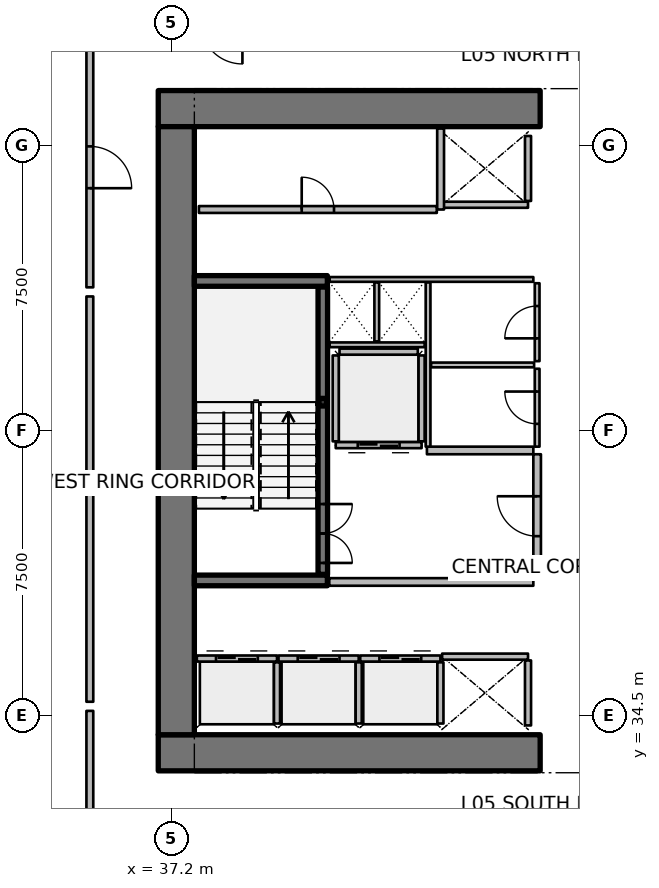
"""IFC4 building model, lengths in metres.
Left out: names, types, materials, properties, quantities, classifications, styles, units other than length and angle.
Written with IfcOpenShell. Run it as: python <this file> out.ifc"""

import sys

from ifc_helpers import new_model, si_unit, direction, frame, frame_2d, origin, origin_2d, place, context, subcontext, project, spatial, rectangle, hollow_rectangle, extrude, element, fill, save


model = new_model("IFC4")
c1 = context("Model", 3, precision=1e-05, world=origin(), true_north=direction((0.0, 1.0)))
c2 = subcontext(c1, "Body", "Model", "MODEL_VIEW")
j1 = project(units=[si_unit("LENGTHUNIT", "METRE"), si_unit("PLANEANGLEUNIT", "RADIAN")], contexts=[c1])
p1 = place(None, origin())
s1 = spatial("IfcSite", under=j1, at=p1, CompositionType="ELEMENT")
p2 = place(p1, origin())
s2 = spatial("IfcBuilding", under=s1, at=p2, CompositionType="ELEMENT")
p3 = place(p2, frame((0.0, 0.0, 26.4)))
s3 = spatial("IfcBuildingStorey", under=s2, at=p3, CompositionType="ELEMENT", Elevation=26.4)
for number, where, z_axis, x_axis in (
    (1, (36.85, 33.525, 0.0), (0.0, 0.0, 1.0), (1.0, 0.0, 0.0)),
    (2, (36.85, 50.475, 0.0), (0.0, 0.0, 1.0), (1.0, 0.0, 0.0)),
):
    element("IfcWall", number, at=place(p3, frame(where, z_axis=z_axis, x_axis=x_axis)), inside=s3, PredefinedType="SHEAR", context=c2, shape_type="SweptSolid", body=[
        extrude(rectangle(XDim=10.05, YDim=0.95, at=frame_2d((5.025, 0.0))), origin(), (0.0, 0.0, 1.0), 3.75),
    ])
p4 = place(p3, frame((37.325, 34.0, 0.0), z_axis=(0.0, 0.0, 1.0), x_axis=(0.0, 1.0, 0.0)))
e3 = element("IfcWall", 3, at=p4, inside=s3, PredefinedType="SHEAR", context=c2, shape_type="SweptSolid", body=[
    extrude(rectangle(XDim=16.0, YDim=0.95, at=frame_2d((8.0, 0.0))), origin(), (0.0, 0.0, 1.0), 3.75),
])
for number, where, z_axis, x_axis in (
    (4, (37.8, 38.06, 0.0), (0.0, 0.0, 1.0), (1.0, 0.0, 0.0)),
    (5, (37.8, 45.94, 0.0), (0.0, 0.0, 1.0), (1.0, 0.0, 0.0)),
):
    element("IfcWall", number, at=place(p3, frame(where, z_axis=z_axis, x_axis=x_axis)), inside=s3, PredefinedType="SHEAR", context=c2, shape_type="SweptSolid", body=[
        extrude(rectangle(XDim=3.5, YDim=0.28, at=frame_2d((1.75, 0.0))), origin(), (0.0, 0.0, 1.0), 3.75),
    ])
p5 = place(p3, frame((41.18, 42.75, 0.0), z_axis=(0.0, 0.0, 1.0), x_axis=(1.0, 0.0, 0.0)))
e6 = element("IfcColumn", 6, at=p5, inside=s3, PredefinedType="COLUMN", context=c2, shape_type="SweptSolid", body=[
    extrude(hollow_rectangle(XDim=0.2, YDim=0.2, WallThickness=0.01, InnerFilletRadius=0.01, OuterFilletRadius=0.02, at=origin_2d()), origin(), (0.0, 0.0, 1.0), 1.67),
])
p6 = place(p3, frame((41.18, 38.22, 0.0), z_axis=(0.0, 0.0, 1.0), x_axis=(0.0, 1.0, 0.0)))
e7 = element("IfcWall", 7, at=p6, inside=s3, PredefinedType="SOLIDWALL", context=c2, shape_type="SweptSolid", body=[
    extrude(rectangle(XDim=7.56, YDim=0.25, at=frame_2d((3.78, 0.0))), origin(), (0.0, 0.0, 1.0), 3.5),
])
p7 = place(p6, frame((0.3, 0.0, 0.0)))
e8 = element("IfcOpeningElement", 8, at=p7, cuts=e7, PredefinedType="OPENING", context=c2, shape_type="SweptSolid", body=[
    extrude(rectangle(XDim=1.55, YDim=2.15, at=frame_2d((0.775, 1.075))), frame((0.0, 0.135, 0.0), z_axis=(0.0, -1.0, 0.0), x_axis=(1.0, 0.0, 0.0)), (0.0, 0.0, 1.0), 0.27),
])
p8 = place(p3, frame((37.865, 36.005, 0.0), z_axis=(0.0, 0.0, 1.0), x_axis=(1.0, 0.0, 0.0)))
e9 = element("IfcWall", 9, at=p8, inside=s3, PredefinedType="PARTITIONING", context=c2, shape_type="SweptSolid", body=[
    extrude(rectangle(XDim=2.11, YDim=0.16, at=frame_2d((1.055, 0.0))), origin(), (0.0, 0.0, 1.0), 3.5),
])
p9 = place(p8, frame((0.505, 0.0, 0.0)))
e10 = element("IfcOpeningElement", 10, at=p9, cuts=e9, PredefinedType="OPENING", context=c2, shape_type="SweptSolid", body=[
    extrude(rectangle(XDim=1.1, YDim=2.1, at=frame_2d((0.55, 1.05))), frame((0.0, 0.09, 0.0), z_axis=(0.0, -1.0, 0.0), x_axis=(1.0, 0.0, 0.0)), (0.0, 0.0, 1.0), 0.18),
])
p10 = place(p3, frame((39.975, 34.295, 0.0), z_axis=(0.0, 0.0, 1.0), x_axis=(0.0, 1.0, 0.0)))
e11 = element("IfcWall", 11, at=p10, inside=s3, PredefinedType="PARTITIONING", context=c2, shape_type="SweptSolid", body=[
    extrude(rectangle(XDim=1.61, YDim=0.16, at=frame_2d((0.805, 0.0))), origin(), (0.0, 0.0, 1.0), 3.5),
])
p11 = place(p3, frame((40.015, 36.005, 0.0), z_axis=(0.0, 0.0, 1.0), x_axis=(1.0, 0.0, 0.0)))
e12 = element("IfcWall", 12, at=p11, inside=s3, PredefinedType="PARTITIONING", context=c2, shape_type="SweptSolid", body=[
    extrude(rectangle(XDim=2.11, YDim=0.16, at=frame_2d((1.055, 0.0))), origin(), (0.0, 0.0, 1.0), 3.5),
])
p12 = place(p11, frame((0.505, 0.0, 0.0)))
e13 = element("IfcOpeningElement", 13, at=p12, cuts=e12, PredefinedType="OPENING", context=c2, shape_type="SweptSolid", body=[
    extrude(rectangle(XDim=1.1, YDim=2.1, at=frame_2d((0.55, 1.05))), frame((0.0, 0.09, 0.0), z_axis=(0.0, -1.0, 0.0), x_axis=(1.0, 0.0, 0.0)), (0.0, 0.0, 1.0), 0.18),
])
p13 = place(p3, frame((42.125, 34.295, 0.0), z_axis=(0.0, 0.0, 1.0), x_axis=(0.0, 1.0, 0.0)))
e14 = element("IfcWall", 14, at=p13, inside=s3, PredefinedType="PARTITIONING", context=c2, shape_type="SweptSolid", body=[
    extrude(rectangle(XDim=1.61, YDim=0.16, at=frame_2d((0.805, 0.0))), origin(), (0.0, 0.0, 1.0), 3.5),
])
p14 = place(p3, frame((42.165, 36.005, 0.0), z_axis=(0.0, 0.0, 1.0), x_axis=(1.0, 0.0, 0.0)))
e15 = element("IfcWall", 15, at=p14, inside=s3, PredefinedType="PARTITIONING", context=c2, shape_type="SweptSolid", body=[
    extrude(rectangle(XDim=2.11, YDim=0.16, at=frame_2d((1.055, 0.0))), origin(), (0.0, 0.0, 1.0), 3.5),
])
p15 = place(p14, frame((0.505, 0.0, 0.0)))
e16 = element("IfcOpeningElement", 16, at=p15, cuts=e15, PredefinedType="OPENING", context=c2, shape_type="SweptSolid", body=[
    extrude(rectangle(XDim=1.1, YDim=2.1, at=frame_2d((0.55, 1.05))), frame((0.0, 0.09, 0.0), z_axis=(0.0, -1.0, 0.0), x_axis=(1.0, 0.0, 0.0)), (0.0, 0.0, 1.0), 0.18),
])
p16 = place(p3, frame((44.275, 34.295, 0.0), z_axis=(0.0, 0.0, 1.0), x_axis=(0.0, 1.0, 0.0)))
e17 = element("IfcWall", 17, at=p16, inside=s3, PredefinedType="PARTITIONING", context=c2, shape_type="SweptSolid", body=[
    extrude(rectangle(XDim=1.61, YDim=0.16, at=frame_2d((0.805, 0.0))), origin(), (0.0, 0.0, 1.0), 3.5),
])
p17 = place(p3, frame((46.58, 47.945, 0.0), z_axis=(0.0, 0.0, 1.0), x_axis=(-1.0, 0.0, 0.0)))
e18 = element("IfcWall", 18, at=p17, inside=s3, PredefinedType="PARTITIONING", context=c2, shape_type="SweptSolid", body=[
    extrude(rectangle(XDim=2.26, YDim=0.16, at=frame_2d((1.13, 0.0))), origin(), (0.0, 0.0, 1.0), 3.5),
])
p18 = place(p3, frame((46.58, 48.045, 0.0), z_axis=(0.0, 0.0, 1.0), x_axis=(0.0, 1.0, 0.0)))
e19 = element("IfcWall", 19, at=p18, inside=s3, PredefinedType="PARTITIONING", context=c2, shape_type="SweptSolid", body=[
    extrude(rectangle(XDim=1.71, YDim=0.16, at=frame_2d((0.855, 0.0))), origin(), (0.0, 0.0, 1.0), 3.5),
])
p19 = place(p3, frame((44.32, 36.055, 0.0), z_axis=(0.0, 0.0, 1.0), x_axis=(1.0, 0.0, 0.0)))
e20 = element("IfcWall", 20, at=p19, inside=s3, PredefinedType="PARTITIONING", context=c2, shape_type="SweptSolid", body=[
    extrude(rectangle(XDim=2.26, YDim=0.16, at=frame_2d((1.13, 0.0))), origin(), (0.0, 0.0, 1.0), 3.5),
])
p20 = place(p3, frame((46.58, 34.245, 0.0), z_axis=(0.0, 0.0, 1.0), x_axis=(0.0, 1.0, 0.0)))
e21 = element("IfcWall", 21, at=p20, inside=s3, PredefinedType="PARTITIONING", context=c2, shape_type="SweptSolid", body=[
    extrude(rectangle(XDim=1.71, YDim=0.16, at=frame_2d((0.855, 0.0))), origin(), (0.0, 0.0, 1.0), 3.5),
])
p21 = place(p3, frame((43.78, 41.62, 0.0), z_axis=(0.0, 0.0, 1.0), x_axis=(-1.0, 0.0, 0.0)))
e22 = element("IfcWall", 22, at=p21, inside=s3, PredefinedType="PARTITIONING", context=c2, shape_type="SweptSolid", body=[
    extrude(rectangle(XDim=2.26, YDim=0.16, at=frame_2d((1.13, 0.0))), origin(), (0.0, 0.0, 1.0), 3.5),
])
p22 = place(p21, frame((0.58, 0.0, 0.0)))
e23 = element("IfcOpeningElement", 23, at=p22, cuts=e22, PredefinedType="OPENING", context=c2, shape_type="SweptSolid", body=[
    extrude(rectangle(XDim=1.1, YDim=2.1, at=frame_2d((0.55, 1.05))), frame((0.0, 0.09, 0.0), z_axis=(0.0, -1.0, 0.0), x_axis=(1.0, 0.0, 0.0)), (0.0, 0.0, 1.0), 0.18),
])
for number, where, z_axis, x_axis in (
    (24, (43.78, 41.72, 0.0), (0.0, 0.0, 1.0), (0.0, 1.0, 0.0)),
    (25, (41.52, 41.72, 0.0), (0.0, 0.0, 1.0), (0.0, 1.0, 0.0)),
):
    element("IfcWall", number, at=place(p3, frame(where, z_axis=z_axis, x_axis=x_axis)), inside=s3, PredefinedType="PARTITIONING", context=c2, shape_type="SweptSolid", body=[
        extrude(rectangle(XDim=2.26, YDim=0.16, at=frame_2d((1.13, 0.0))), origin(), (0.0, 0.0, 1.0), 3.5),
    ])
p23 = place(p3, frame((41.62, 44.08, 0.0), z_axis=(0.0, 0.0, 1.0), x_axis=(1.0, 0.0, 0.0)))
e26 = element("IfcWall", 26, at=p23, inside=s3, PredefinedType="PARTITIONING", context=c2, shape_type="SweptSolid", body=[
    extrude(rectangle(XDim=2.06, YDim=0.16, at=frame_2d((1.03, 0.0))), origin(), (0.0, 0.0, 1.0), 3.5),
])
p24 = place(p3, frame((37.92, 47.82, 0.0), z_axis=(0.0, 0.0, 1.0), x_axis=(1.0, 0.0, 0.0)))
e27 = element("IfcWall", 27, at=p24, inside=s3, PredefinedType="PARTITIONING", context=c2, shape_type="SweptSolid", body=[
    extrude(rectangle(XDim=6.26, YDim=0.18, at=frame_2d((3.13, 0.0))), origin(), (0.0, 0.0, 1.0), 3.5),
])
p25 = place(p24, frame((2.705, 0.0, 0.0)))
e28 = element("IfcOpeningElement", 28, at=p25, cuts=e27, PredefinedType="OPENING", context=c2, shape_type="SweptSolid", body=[
    extrude(rectangle(XDim=0.85, YDim=2.06, at=frame_2d((0.425, 1.03))), frame((0.0, 0.1, 0.0), z_axis=(0.0, -1.0, 0.0), x_axis=(1.0, 0.0, 0.0)), (0.0, 0.0, 1.0), 0.2),
])
p26 = place(p3, frame((44.28, 47.82, 0.0), z_axis=(0.0, 0.0, 1.0), x_axis=(0.0, 1.0, 0.0)))
e29 = element("IfcWall", 29, at=p26, inside=s3, PredefinedType="PARTITIONING", context=c2, shape_type="SweptSolid", body=[
    extrude(rectangle(XDim=2.13, YDim=0.18, at=frame_2d((1.065, 0.0))), origin(), (0.0, 0.0, 1.0), 3.5),
])
p27 = place(p3, frame((41.35, 38.02, 0.0), z_axis=(0.0, 0.0, 1.0), x_axis=(1.0, 0.0, 0.0)))
e30 = element("IfcWall", 30, at=p27, inside=s3, PredefinedType="PARTITIONING", context=c2, shape_type="SweptSolid", body=[
    extrude(rectangle(XDim=5.37, YDim=0.2, at=frame_2d((2.685, 0.0))), origin(), (0.0, 0.0, 1.0), 3.5),
])
p28 = place(p3, frame((43.92, 41.48, 0.0), z_axis=(0.0, 0.0, 1.0), x_axis=(1.0, 0.0, 0.0)))
e31 = element("IfcWall", 31, at=p28, inside=s3, PredefinedType="PARTITIONING", context=c2, shape_type="SweptSolid", body=[
    extrude(rectangle(XDim=2.8, YDim=0.2, at=frame_2d((1.4, 0.0))), origin(), (0.0, 0.0, 1.0), 3.5),
])
p29 = place(p3, frame((46.82, 38.12, 0.0), z_axis=(0.0, 0.0, 1.0), x_axis=(0.0, 1.0, 0.0)))
e32 = element("IfcWall", 32, at=p29, inside=s3, PredefinedType="PARTITIONING", context=c2, shape_type="SweptSolid", body=[
    extrude(rectangle(XDim=3.26, YDim=0.2, at=frame_2d((1.63, 0.0))), origin(), (0.0, 0.0, 1.0), 3.5),
])
p30 = place(p29, frame((1.105, 0.0, 0.0)))
e33 = element("IfcOpeningElement", 33, at=p30, cuts=e32, PredefinedType="OPENING", context=c2, shape_type="SweptSolid", body=[
    extrude(rectangle(XDim=1.05, YDim=2.1, at=frame_2d((0.525, 1.05))), frame((0.0, 0.11, 0.0), z_axis=(0.0, -1.0, 0.0), x_axis=(1.0, 0.0, 0.0)), (0.0, 0.0, 1.0), 0.22),
])
p31 = place(p3, frame((41.36, 45.98, 0.0), z_axis=(0.0, 0.0, 1.0), x_axis=(1.0, 0.0, 0.0)))
e34 = element("IfcWall", 34, at=p31, inside=s3, PredefinedType="PARTITIONING", context=c2, shape_type="SweptSolid", body=[
    extrude(rectangle(XDim=5.36, YDim=0.125, at=frame_2d((2.68, 0.0))), origin(), (0.0, 0.0, 1.0), 2.94),
])
p32 = place(p3, frame((41.36, 44.26, 0.0), z_axis=(0.0, 0.0, 1.0), x_axis=(1.0, 0.0, 0.0)))
e35 = element("IfcWall", 35, at=p32, inside=s3, PredefinedType="PARTITIONING", context=c2, shape_type="SweptSolid", body=[
    extrude(rectangle(XDim=2.5, YDim=0.125, at=frame_2d((1.25, 0.0))), origin(), (0.0, 0.0, 1.0), 2.94),
])
p33 = place(p3, frame((42.6, 44.35, 0.0), z_axis=(0.0, 0.0, 1.0), x_axis=(0.0, 1.0, 0.0)))
e36 = element("IfcWall", 36, at=p33, inside=s3, PredefinedType="PARTITIONING", context=c2, shape_type="SweptSolid", body=[
    extrude(rectangle(XDim=1.55, YDim=0.125, at=frame_2d((0.775, 0.0))), origin(), (0.0, 0.0, 1.0), 2.94),
])
p34 = place(p3, frame((43.95, 41.58, 0.0), z_axis=(0.0, 0.0, 1.0), x_axis=(0.0, 1.0, 0.0)))
e37 = element("IfcWall", 37, at=p34, inside=s3, PredefinedType="PARTITIONING", context=c2, shape_type="SweptSolid", body=[
    extrude(rectangle(XDim=4.32, YDim=0.125, at=frame_2d((2.16, 0.0))), origin(), (0.0, 0.0, 1.0), 2.94),
])
p35 = place(p3, frame((44.03, 43.73, 0.0), z_axis=(0.0, 0.0, 1.0), x_axis=(1.0, 0.0, 0.0)))
e38 = element("IfcWall", 38, at=p35, inside=s3, PredefinedType="PARTITIONING", context=c2, shape_type="SweptSolid", body=[
    extrude(rectangle(XDim=2.71, YDim=0.125, at=frame_2d((1.355, 0.0))), origin(), (0.0, 0.0, 1.0), 2.94),
])
p36 = place(p3, frame((46.82, 41.58, 0.0), z_axis=(0.0, 0.0, 1.0), x_axis=(0.0, 1.0, 0.0)))
e39 = element("IfcWall", 39, at=p36, inside=s3, PredefinedType="PARTITIONING", context=c2, shape_type="SweptSolid", body=[
    extrude(rectangle(XDim=2.05, YDim=0.125, at=frame_2d((1.025, 0.0))), origin(), (0.0, 0.0, 1.0), 2.94),
])
p37 = place(p36, frame((0.6, 0.0, 0.0)))
e40 = element("IfcOpeningElement", 40, at=p37, cuts=e39, PredefinedType="OPENING", context=c2, shape_type="SweptSolid", body=[
    extrude(rectangle(XDim=0.85, YDim=2.06, at=frame_2d((0.425, 1.03))), frame((0.0, 0.073, 0.0), z_axis=(0.0, -1.0, 0.0), x_axis=(1.0, 0.0, 0.0)), (0.0, 0.0, 1.0), 0.145),
])
p38 = place(p3, frame((46.82, 43.83, 0.0), z_axis=(0.0, 0.0, 1.0), x_axis=(0.0, 1.0, 0.0)))
e41 = element("IfcWall", 41, at=p38, inside=s3, PredefinedType="PARTITIONING", context=c2, shape_type="SweptSolid", body=[
    extrude(rectangle(XDim=2.05, YDim=0.125, at=frame_2d((1.025, 0.0))), origin(), (0.0, 0.0, 1.0), 2.94),
])
p39 = place(p38, frame((0.6, 0.0, 0.0)))
e42 = element("IfcOpeningElement", 42, at=p39, cuts=e41, PredefinedType="OPENING", context=c2, shape_type="SweptSolid", body=[
    extrude(rectangle(XDim=0.85, YDim=2.06, at=frame_2d((0.425, 1.03))), frame((0.0, 0.073, 0.0), z_axis=(0.0, -1.0, 0.0), x_axis=(1.0, 0.0, 0.0)), (0.0, 0.0, 1.0), 0.145),
])
p40 = place(p3, frame((35.05, 52.089, 0.0), z_axis=(0.0, 0.0, 1.0), x_axis=(0.0, -1.0, 0.0)))
e43 = element("IfcWall", 43, at=p40, inside=s3, PredefinedType="PARTITIONING", context=c2, shape_type="SweptSolid", body=[
    extrude(rectangle(XDim=6.317, YDim=0.18, at=frame_2d((3.158, 0.0))), origin(), (0.0, 0.0, 1.0), 2.867),
])
p41 = place(p40, frame((2.608, 0.0, 0.0)))
e44 = element("IfcOpeningElement", 44, at=p41, cuts=e43, PredefinedType="OPENING", context=c2, shape_type="SweptSolid", body=[
    extrude(rectangle(XDim=1.1, YDim=2.1, at=frame_2d((0.55, 1.05))), frame((0.0, 0.1, 0.0), z_axis=(0.0, -1.0, 0.0), x_axis=(1.0, 0.0, 0.0)), (0.0, 0.0, 1.0), 0.2),
])
p42 = place(p3, frame((35.05, 45.532, 0.0), z_axis=(0.0, 0.0, 1.0), x_axis=(0.0, -1.0, 0.0)))
e45 = element("IfcWall", 45, at=p42, inside=s3, PredefinedType="PARTITIONING", context=c2, shape_type="SweptSolid", body=[
    extrude(rectangle(XDim=4.945, YDim=0.18, at=frame_2d((2.472, 0.0))), origin(), (0.0, 0.0, 1.0), 2.867),
])
p43 = place(p3, frame((35.05, 40.347, 0.0), z_axis=(0.0, 0.0, 1.0), x_axis=(0.0, -1.0, 0.0)))
e46 = element("IfcWall", 46, at=p43, inside=s3, PredefinedType="PARTITIONING", context=c2, shape_type="SweptSolid", body=[
    extrude(rectangle(XDim=5.48, YDim=0.18, at=frame_2d((2.74, 0.0))), origin(), (0.0, 0.0, 1.0), 2.867),
])
p44 = place(p3, frame((35.05, 34.628, 0.0), z_axis=(0.0, 0.0, 1.0), x_axis=(0.0, -1.0, 0.0)))
e47 = element("IfcWall", 47, at=p44, inside=s3, PredefinedType="PARTITIONING", context=c2, shape_type="SweptSolid", body=[
    extrude(rectangle(XDim=3.258, YDim=0.18, at=frame_2d((1.629, 0.0))), origin(), (0.0, 0.0, 1.0), 2.867),
])
p45 = place(p7, origin())
e48 = element("IfcDoor", 48, at=p45, inside=s3, OperationType="DOUBLE_DOOR_SINGLE_SWING", PredefinedType="DOOR", context=c2, shape_type="SweptSolid", body=[
    extrude(rectangle(XDim=1.55, YDim=2.15, at=frame_2d((0.775, 1.075))), frame((0.0, 0.025, 0.0), z_axis=(0.0, -1.0, 0.0), x_axis=(1.0, 0.0, 0.0)), (0.0, 0.0, 1.0), 0.05),
])
fill(e8, e48)
p46 = place(p9, origin())
e49 = element("IfcDoor", 49, at=p46, inside=s3, OperationType="DOUBLE_DOOR_SLIDING", PredefinedType="DOOR", context=c2, shape_type="SweptSolid", body=[
    extrude(rectangle(XDim=1.1, YDim=2.1, at=frame_2d((0.55, 1.05))), frame((0.0, 0.025, 0.0), z_axis=(0.0, -1.0, 0.0), x_axis=(1.0, 0.0, 0.0)), (0.0, 0.0, 1.0), 0.05),
])
fill(e10, e49)
p47 = place(p12, origin())
e50 = element("IfcDoor", 50, at=p47, inside=s3, OperationType="DOUBLE_DOOR_SLIDING", PredefinedType="DOOR", context=c2, shape_type="SweptSolid", body=[
    extrude(rectangle(XDim=1.1, YDim=2.1, at=frame_2d((0.55, 1.05))), frame((0.0, 0.025, 0.0), z_axis=(0.0, -1.0, 0.0), x_axis=(1.0, 0.0, 0.0)), (0.0, 0.0, 1.0), 0.05),
])
fill(e13, e50)
p48 = place(p15, origin())
e51 = element("IfcDoor", 51, at=p48, inside=s3, OperationType="DOUBLE_DOOR_SLIDING", PredefinedType="DOOR", context=c2, shape_type="SweptSolid", body=[
    extrude(rectangle(XDim=1.1, YDim=2.1, at=frame_2d((0.55, 1.05))), frame((0.0, 0.025, 0.0), z_axis=(0.0, -1.0, 0.0), x_axis=(1.0, 0.0, 0.0)), (0.0, 0.0, 1.0), 0.05),
])
fill(e16, e51)
p49 = place(p22, origin())
e52 = element("IfcDoor", 52, at=p49, inside=s3, OperationType="DOUBLE_DOOR_SLIDING", PredefinedType="DOOR", context=c2, shape_type="SweptSolid", body=[
    extrude(rectangle(XDim=1.1, YDim=2.1, at=frame_2d((0.55, 1.05))), frame((0.0, 0.025, 0.0), z_axis=(0.0, -1.0, 0.0), x_axis=(1.0, 0.0, 0.0)), (0.0, 0.0, 1.0), 0.05),
])
fill(e23, e52)
p50 = place(p25, origin())
e53 = element("IfcDoor", 53, at=p50, inside=s3, OperationType="SINGLE_SWING_LEFT", PredefinedType="DOOR", context=c2, shape_type="SweptSolid", body=[
    extrude(rectangle(XDim=0.85, YDim=2.06, at=frame_2d((0.425, 1.03))), frame((0.0, 0.025, 0.0), z_axis=(0.0, -1.0, 0.0), x_axis=(1.0, 0.0, 0.0)), (0.0, 0.0, 1.0), 0.05),
])
fill(e28, e53)
p51 = place(p30, origin())
e54 = element("IfcDoor", 54, at=p51, inside=s3, OperationType="SINGLE_SWING_RIGHT", PredefinedType="DOOR", context=c2, shape_type="SweptSolid", body=[
    extrude(rectangle(XDim=1.05, YDim=2.1, at=frame_2d((0.525, 1.05))), frame((0.0, 0.025, 0.0), z_axis=(0.0, -1.0, 0.0), x_axis=(1.0, 0.0, 0.0)), (0.0, 0.0, 1.0), 0.05),
])
fill(e33, e54)
p52 = place(p37, origin())
e55 = element("IfcDoor", 55, at=p52, inside=s3, OperationType="SINGLE_SWING_RIGHT", PredefinedType="DOOR", context=c2, shape_type="SweptSolid", body=[
    extrude(rectangle(XDim=0.85, YDim=2.06, at=frame_2d((0.425, 1.03))), frame((0.0, 0.025, 0.0), z_axis=(0.0, -1.0, 0.0), x_axis=(1.0, 0.0, 0.0)), (0.0, 0.0, 1.0), 0.05),
])
fill(e40, e55)
p53 = place(p39, origin())
e56 = element("IfcDoor", 56, at=p53, inside=s3, OperationType="SINGLE_SWING_LEFT", PredefinedType="DOOR", context=c2, shape_type="SweptSolid", body=[
    extrude(rectangle(XDim=0.85, YDim=2.06, at=frame_2d((0.425, 1.03))), frame((0.0, 0.025, 0.0), z_axis=(0.0, -1.0, 0.0), x_axis=(1.0, 0.0, 0.0)), (0.0, 0.0, 1.0), 0.05),
])
fill(e42, e56)
p54 = place(p41, origin())
e57 = element("IfcDoor", 57, at=p54, inside=s3, OperationType="SINGLE_SWING_RIGHT", PredefinedType="DOOR", context=c2, shape_type="SweptSolid", body=[
    extrude(rectangle(XDim=1.1, YDim=2.1, at=frame_2d((0.55, 1.05))), frame((0.0, 0.025, 0.0), z_axis=(0.0, -1.0, 0.0), x_axis=(1.0, 0.0, 0.0)), (0.0, 0.0, 1.0), 0.05),
])
fill(e44, e57)
save(model, sys.argv[1])
